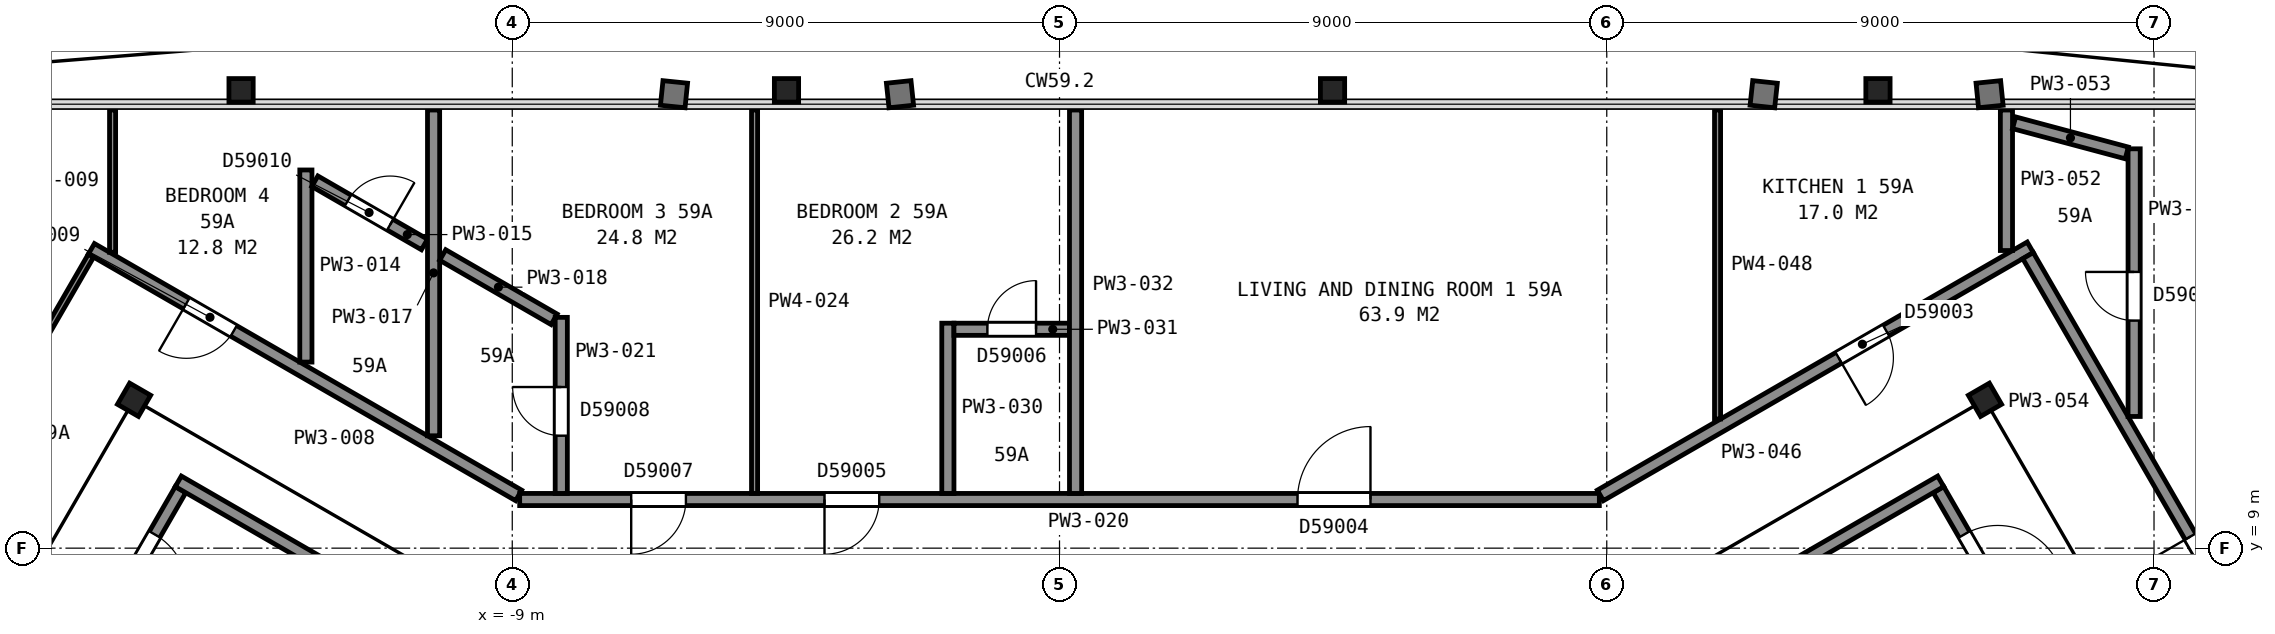
"""IFC4 building model, lengths in metres.
Left out: names, types, materials, properties, quantities, classifications, styles, units other than length and angle.
Written with IfcOpenShell. Run it as: python <this file> out.ifc"""

import sys

from ifc_helpers import new_model, si_unit, direction, frame, frame_2d, origin, origin_2d, place, context, subcontext, project, spatial, rectangle, i_section, extrude, element, fill, save


model = new_model("IFC4")
c1 = context("Model", 3, precision=1e-05, world=origin(), true_north=direction((0.0, 1.0)))
c2 = subcontext(c1, "Body", "Model", "MODEL_VIEW")
j1 = project(units=[si_unit("LENGTHUNIT", "METRE"), si_unit("PLANEANGLEUNIT", "RADIAN")], contexts=[c1])
p1 = place(None, origin())
s1 = spatial("IfcSite", under=j1, at=p1, CompositionType="ELEMENT")
p2 = place(p1, origin())
s2 = spatial("IfcBuilding", under=s1, at=p2, CompositionType="ELEMENT")
p3 = place(p2, frame((0.0, 0.0, 236.0)))
s3 = spatial("IfcBuildingStorey", under=s2, at=p3, CompositionType="ELEMENT", Elevation=236.0)
for number, where, z_axis, x_axis in (
    (1, (13.46, 16.53, 0.035), (0.0, 0.0, 1.0), (1.0, 0.0, 0.0)),
    (2, (4.49, 16.53, 0.035), (0.0, 0.0, 1.0), (1.0, 0.0, 0.0)),
    (3, (-4.49, 16.53, 0.035), (0.0, 0.0, 1.0), (1.0, 0.0, 0.0)),
    (4, (-13.46, 16.53, 0.035), (0.0, 0.0, 1.0), (1.0, 0.0, 0.0)),
):
    element("IfcColumn", number, at=place(p3, frame(where, z_axis=z_axis, x_axis=x_axis)), inside=s3, PredefinedType="COLUMN", context=c2, shape_type="SweptSolid", body=[
        extrude(i_section(OverallWidth=0.399, OverallDepth=0.386, WebThickness=0.021, FlangeThickness=0.033, FilletRadius=0.015, at=origin_2d()), origin(), (0.0, 0.0, 1.0), 3.665),
    ])
for number, where, z_axis, x_axis in (
    (5, (15.22, 11.44, 0.0), (0.0, 0.0, 1.0), (0.5, -0.866, 0.0)),
    (6, (-15.22, 11.44, 0.0), (0.0, 0.0, 1.0), (0.5, 0.866, 0.0)),
):
    element("IfcColumn", number, at=place(p3, frame(where, z_axis=z_axis, x_axis=x_axis)), inside=s3, PredefinedType="COLUMN", context=c2, shape_type="SweptSolid", body=[
        extrude(i_section(OverallWidth=0.401, OverallDepth=0.399, WebThickness=0.025, FlangeThickness=0.04, FilletRadius=0.015, at=origin_2d()), origin(), (0.0, 0.0, 1.0), 3.7),
    ])
p4 = place(p3, frame((15.855, 7.538, 0.0), z_axis=(0.0, 0.0, 1.0), x_axis=(-0.500049511043, 0.865996816683, 0.0)))
e7 = element("IfcWall", 7, at=p4, inside=s3, PredefinedType="PARTITIONING", context=c2, shape_type="SweptSolid", body=[
    extrude(rectangle(XDim=2.8, YDim=0.2, at=frame_2d((1.4, 0.0))), origin(), (0.0, 0.0, 1.0), 3.45),
])
p5 = place(p4, frame((0.85, 0.0, 0.0)))
e8 = element("IfcOpeningElement", 8, at=p5, cuts=e7, PredefinedType="OPENING", context=c2, shape_type="SweptSolid", body=[
    extrude(rectangle(XDim=1.1, YDim=2.1, at=frame_2d((0.55, 1.05))), frame((0.0, 0.11, 0.0), z_axis=(0.0, -1.0, 0.0), x_axis=(1.0, 0.0, 0.0)), (0.0, 0.0, 1.0), 0.22),
])
p6 = place(p3, frame((6.178, 5.299, 0.0), z_axis=(0.0, 0.0, 1.0), x_axis=(0.866019993635, 0.500009370536, 0.0)))
e9 = element("IfcWall", 9, at=p6, inside=s3, PredefinedType="PARTITIONING", context=c2, shape_type="SweptSolid", body=[
    extrude(rectangle(XDim=9.6, YDim=0.2, at=frame_2d((4.8, 0.0))), origin(), (0.0, 0.0, 1.0), 3.45),
])
p7 = place(p3, frame((-14.455, 9.962, 0.0), z_axis=(0.0, 0.0, 1.0), x_axis=(-0.500049511043, -0.865996816683, 0.0)))
e10 = element("IfcWall", 10, at=p7, inside=s3, PredefinedType="PARTITIONING", context=c2, shape_type="SweptSolid", body=[
    extrude(rectangle(XDim=2.8, YDim=0.2, at=frame_2d((1.4, 0.0))), origin(), (0.0, 0.0, 1.0), 3.45),
])
p8 = place(p7, frame((0.85, 0.0, 0.0)))
e11 = element("IfcOpeningElement", 11, at=p8, cuts=e10, PredefinedType="OPENING", context=c2, shape_type="SweptSolid", body=[
    extrude(rectangle(XDim=1.1, YDim=2.1, at=frame_2d((0.55, 1.05))), frame((0.0, 0.11, 0.0), z_axis=(0.0, -1.0, 0.0), x_axis=(1.0, 0.0, 0.0)), (0.0, 0.0, 1.0), 0.22),
])
p9 = place(p3, frame((-6.178, 5.299, 0.0), z_axis=(0.0, 0.0, 1.0), x_axis=(-0.866019993635, 0.500009370536, 0.0)))
e12 = element("IfcWall", 12, at=p9, inside=s3, PredefinedType="PARTITIONING", context=c2, shape_type="SweptSolid", body=[
    extrude(rectangle(XDim=9.6, YDim=0.2, at=frame_2d((4.8, 0.0))), origin(), (0.0, 0.0, 1.0), 3.45),
])
p10 = place(p3, frame((-19.93, 6.888, 0.0), z_axis=(0.0, 0.0, 1.0), x_axis=(0.500420003794, 0.865782778648, 0.0)))
e13 = element("IfcWall", 13, at=p10, inside=s3, PredefinedType="PARTITIONING", context=c2, shape_type="SweptSolid", body=[
    extrude(rectangle(XDim=7.997, YDim=0.1, at=frame_2d((3.999, 0.0))), origin(), (0.0, 0.0, 1.0), 2.713),
])
p11 = place(p10, frame((3.4, 0.0, 0.0)))
e14 = element("IfcOpeningElement", 14, at=p11, cuts=e13, PredefinedType="OPENING", context=c2, shape_type="SweptSolid", body=[
    extrude(rectangle(XDim=1.2, YDim=2.1, at=frame_2d((0.6, 1.05))), frame((0.0, 0.06, 0.0), z_axis=(0.0, -1.0, 0.0), x_axis=(1.0, 0.0, 0.0)), (0.0, 0.0, 1.0), 0.12),
])
p12 = place(p3, frame((-15.921, 13.923, 0.0), z_axis=(0.0, 0.0, 1.0), x_axis=(0.866079355551, -0.499906541154, 0.0)))
e15 = element("IfcWall", 15, at=p12, inside=s3, PredefinedType="PARTITIONING", context=c2, shape_type="SweptSolid", body=[
    extrude(rectangle(XDim=8.113, YDim=0.2, at=frame_2d((4.056, 0.0))), origin(), (0.0, 0.0, 1.0), 2.713),
])
p13 = place(p12, frame((1.802, 0.0, 0.0)))
e16 = element("IfcOpeningElement", 16, at=p13, cuts=e15, PredefinedType="OPENING", context=c2, shape_type="SweptSolid", body=[
    extrude(rectangle(XDim=0.9, YDim=2.1, at=frame_2d((0.45, 1.05))), frame((0.0, 0.11, 0.0), z_axis=(0.0, -1.0, 0.0), x_axis=(1.0, 0.0, 0.0)), (0.0, 0.0, 1.0), 0.22),
])
p14 = place(p3, frame((-15.573, 13.866, 0.0), z_axis=(0.0, 0.0, 1.0), x_axis=(0.0, 1.0, 0.0)))
e17 = element("IfcWall", 17, at=p14, inside=s3, PredefinedType="PARTITIONING", context=c2, shape_type="SweptSolid", body=[
    extrude(rectangle(XDim=2.34, YDim=0.1, at=frame_2d((1.17, 0.0))), origin(), (0.0, 0.0, 1.0), 2.713),
])
p15 = place(p3, frame((-12.394, 12.06, 0.0), z_axis=(0.0, 0.0, 1.0), x_axis=(0.0, 1.0, 0.0)))
e18 = element("IfcWall", 18, at=p15, inside=s3, PredefinedType="PARTITIONING", context=c2, shape_type="SweptSolid", body=[
    extrude(rectangle(XDim=3.16, YDim=0.2, at=frame_2d((1.58, 0.0))), origin(), (0.0, 0.0, 1.0), 2.713),
])
p16 = place(p3, frame((-10.444, 13.995, 0.0), z_axis=(0.0, 0.0, 1.0), x_axis=(-0.866134808485, 0.499810457605, 0.0)))
e19 = element("IfcWall", 19, at=p16, inside=s3, PredefinedType="PARTITIONING", context=c2, shape_type="SweptSolid", body=[
    extrude(rectangle(XDim=2.081, YDim=0.2, at=frame_2d((1.041, 0.0))), origin(), (0.0, 0.0, 1.0), 2.713),
])
p17 = place(p16, frame((0.651, 0.0, 0.0)))
e20 = element("IfcOpeningElement", 20, at=p17, cuts=e19, PredefinedType="OPENING", context=c2, shape_type="SweptSolid", body=[
    extrude(rectangle(XDim=0.8, YDim=2.1, at=frame_2d((0.4, 1.05))), frame((0.0, 0.11, 0.0), z_axis=(0.0, -1.0, 0.0), x_axis=(1.0, 0.0, 0.0)), (0.0, 0.0, 1.0), 0.22),
])
p18 = place(p3, frame((-10.294, 10.848, 0.0), z_axis=(0.0, 0.0, 1.0), x_axis=(0.0, 1.0, 0.0)))
e21 = element("IfcWall", 21, at=p18, inside=s3, PredefinedType="PARTITIONING", context=c2, shape_type="SweptSolid", body=[
    extrude(rectangle(XDim=5.358, YDim=0.2, at=frame_2d((2.679, 0.0))), origin(), (0.0, 0.0, 1.0), 2.713),
])
p19 = place(p3, frame((-10.144, 13.822, 0.0), z_axis=(0.0, 0.0, 1.0), x_axis=(0.866062654302, -0.49993547466, 0.0)))
e22 = element("IfcWall", 22, at=p19, inside=s3, PredefinedType="PARTITIONING", context=c2, shape_type="SweptSolid", body=[
    extrude(rectangle(XDim=2.116, YDim=0.2, at=frame_2d((1.058, 0.0))), origin(), (0.0, 0.0, 1.0), 2.713),
])
p20 = place(p3, frame((-8.878, 9.8, 0.0), z_axis=(0.0, 0.0, 1.0), x_axis=(1.0, 0.0, 0.0)))
e23 = element("IfcWall", 23, at=p20, inside=s3, PredefinedType="PARTITIONING", context=c2, shape_type="SweptSolid", body=[
    extrude(rectangle(XDim=17.756, YDim=0.2, at=frame_2d((8.878, 0.0))), origin(), (0.0, 0.0, 1.0), 2.713),
])
p21 = place(p20, frame((12.792, 0.0, 0.0)))
e24 = element("IfcOpeningElement", 24, at=p21, cuts=e23, PredefinedType="OPENING", context=c2, shape_type="SweptSolid", body=[
    extrude(rectangle(XDim=1.2, YDim=2.1, at=frame_2d((0.6, 1.05))), frame((0.0, 0.11, 0.0), z_axis=(0.0, -1.0, 0.0), x_axis=(1.0, 0.0, 0.0)), (0.0, 0.0, 1.0), 0.22),
])
p22 = place(p20, frame((5.013, 0.0, 0.0)))
e25 = element("IfcOpeningElement", 25, at=p22, cuts=e23, PredefinedType="OPENING", context=c2, shape_type="SweptSolid", body=[
    extrude(rectangle(XDim=0.9, YDim=2.1, at=frame_2d((0.45, 1.05))), frame((0.0, 0.11, 0.0), z_axis=(0.0, -1.0, 0.0), x_axis=(1.0, 0.0, 0.0)), (0.0, 0.0, 1.0), 0.22),
])
p23 = place(p20, frame((1.834, 0.0, 0.0)))
e26 = element("IfcOpeningElement", 26, at=p23, cuts=e23, PredefinedType="OPENING", context=c2, shape_type="SweptSolid", body=[
    extrude(rectangle(XDim=0.9, YDim=2.1, at=frame_2d((0.45, 1.05))), frame((0.0, 0.11, 0.0), z_axis=(0.0, -1.0, 0.0), x_axis=(1.0, 0.0, 0.0)), (0.0, 0.0, 1.0), 0.22),
])
p24 = place(p3, frame((-8.194, 9.9, 0.0), z_axis=(0.0, 0.0, 1.0), x_axis=(0.0, 1.0, 0.0)))
e27 = element("IfcWall", 27, at=p24, inside=s3, PredefinedType="PARTITIONING", context=c2, shape_type="SweptSolid", body=[
    extrude(rectangle(XDim=2.896, YDim=0.2, at=frame_2d((1.448, 0.0))), origin(), (0.0, 0.0, 1.0), 2.713),
])
p25 = place(p24, frame((0.95, 0.0, 0.0)))
e28 = element("IfcOpeningElement", 28, at=p25, cuts=e27, PredefinedType="OPENING", context=c2, shape_type="SweptSolid", body=[
    extrude(rectangle(XDim=0.8, YDim=2.1, at=frame_2d((0.4, 1.05))), frame((0.0, 0.11, 0.0), z_axis=(0.0, -1.0, 0.0), x_axis=(1.0, 0.0, 0.0)), (0.0, 0.0, 1.0), 0.22),
])
p26 = place(p3, frame((-5.015, 9.9, 0.0), z_axis=(0.0, 0.0, 1.0), x_axis=(0.0, 1.0, 0.0)))
e29 = element("IfcWall", 29, at=p26, inside=s3, PredefinedType="PARTITIONING", context=c2, shape_type="SweptSolid", body=[
    extrude(rectangle(XDim=6.306, YDim=0.1, at=frame_2d((3.153, 0.0))), origin(), (0.0, 0.0, 1.0), 2.713),
])
p27 = place(p3, frame((-1.836, 9.9, 0.0), z_axis=(0.0, 0.0, 1.0), x_axis=(0.0, 1.0, 0.0)))
e30 = element("IfcWall", 30, at=p27, inside=s3, PredefinedType="PARTITIONING", context=c2, shape_type="SweptSolid", body=[
    extrude(rectangle(XDim=2.8, YDim=0.2, at=frame_2d((1.4, 0.0))), origin(), (0.0, 0.0, 1.0), 2.713),
])
p28 = place(p3, frame((0.164, 12.6, 0.0), z_axis=(0.0, 0.0, 1.0), x_axis=(-1.0, 0.0, 0.0)))
e31 = element("IfcWall", 31, at=p28, inside=s3, PredefinedType="PARTITIONING", context=c2, shape_type="SweptSolid", body=[
    extrude(rectangle(XDim=1.9, YDim=0.2, at=frame_2d((0.95, 0.0))), origin(), (0.0, 0.0, 1.0), 2.713),
])
p29 = place(p28, frame((0.55, 0.0, 0.0)))
e32 = element("IfcOpeningElement", 32, at=p29, cuts=e31, PredefinedType="OPENING", context=c2, shape_type="SweptSolid", body=[
    extrude(rectangle(XDim=0.8, YDim=2.1, at=frame_2d((0.4, 1.05))), frame((0.0, 0.11, 0.0), z_axis=(0.0, -1.0, 0.0), x_axis=(1.0, 0.0, 0.0)), (0.0, 0.0, 1.0), 0.22),
])
p30 = place(p3, frame((0.264, 9.9, 0.0), z_axis=(0.0, 0.0, 1.0), x_axis=(0.0, 1.0, 0.0)))
e33 = element("IfcWall", 33, at=p30, inside=s3, PredefinedType="PARTITIONING", context=c2, shape_type="SweptSolid", body=[
    extrude(rectangle(XDim=6.306, YDim=0.2, at=frame_2d((3.153, 0.0))), origin(), (0.0, 0.0, 1.0), 2.713),
])
p31 = place(p3, frame((8.895, 9.867, 0.0), z_axis=(0.0, 0.0, 1.0), x_axis=(0.866081499088, 0.499902827495, 0.0)))
e34 = element("IfcWall", 34, at=p31, inside=s3, PredefinedType="PARTITIONING", context=c2, shape_type="SweptSolid", body=[
    extrude(rectangle(XDim=8.163, YDim=0.2, at=frame_2d((4.081, 0.0))), origin(), (0.0, 0.0, 1.0), 2.713),
])
p32 = place(p31, frame((4.525, 0.0, 0.0)))
e35 = element("IfcOpeningElement", 35, at=p32, cuts=e34, PredefinedType="OPENING", context=c2, shape_type="SweptSolid", body=[
    extrude(rectangle(XDim=0.9, YDim=2.1, at=frame_2d((0.45, 1.05))), frame((0.0, 0.11, 0.0), z_axis=(0.0, -1.0, 0.0), x_axis=(1.0, 0.0, 0.0)), (0.0, 0.0, 1.0), 0.22),
])
p33 = place(p3, frame((10.822, 11.124, 0.0), z_axis=(0.0, 0.0, 1.0), x_axis=(0.0, 1.0, 0.0)))
e36 = element("IfcWall", 36, at=p33, inside=s3, PredefinedType="PARTITIONING", context=c2, shape_type="SweptSolid", body=[
    extrude(rectangle(XDim=5.082, YDim=0.1, at=frame_2d((2.541, 0.0))), origin(), (0.0, 0.0, 1.0), 2.713),
])
p34 = place(p3, frame((15.573, 13.895, 0.0), z_axis=(0.0, 0.0, 1.0), x_axis=(0.0, 1.0, 0.0)))
e37 = element("IfcWall", 37, at=p34, inside=s3, PredefinedType="PARTITIONING", context=c2, shape_type="SweptSolid", body=[
    extrude(rectangle(XDim=2.311, YDim=0.2, at=frame_2d((1.155, 0.0))), origin(), (0.0, 0.0, 1.0), 2.713),
])
p35 = place(p3, frame((15.699, 15.996, 0.0), z_axis=(0.0, 0.0, 1.0), x_axis=(0.96599800534, -0.258549518816, 0.0)))
e38 = element("IfcWall", 38, at=p35, inside=s3, PredefinedType="PARTITIONING", context=c2, shape_type="SweptSolid", body=[
    extrude(rectangle(XDim=1.919, YDim=0.2, at=frame_2d((0.959, 0.0))), origin(), (0.0, 0.0, 1.0), 2.713),
])
p36 = place(p3, frame((15.928, 13.812, 0.0), z_axis=(0.0, 0.0, 1.0), x_axis=(0.500422653123, -0.865781247337, 0.0)))
e39 = element("IfcWall", 39, at=p36, inside=s3, PredefinedType="PARTITIONING", context=c2, shape_type="SweptSolid", body=[
    extrude(rectangle(XDim=8.047, YDim=0.2, at=frame_2d((4.024, 0.0))), origin(), (0.0, 0.0, 1.0), 2.713),
])
p37 = place(p36, frame((5.337, 0.0, 0.0)))
e40 = element("IfcOpeningElement", 40, at=p37, cuts=e39, PredefinedType="OPENING", context=c2, shape_type="SweptSolid", body=[
    extrude(rectangle(XDim=0.9, YDim=2.1, at=frame_2d((0.45, 1.05))), frame((0.0, 0.11, 0.0), z_axis=(0.0, -1.0, 0.0), x_axis=(1.0, 0.0, 0.0)), (0.0, 0.0, 1.0), 0.22),
])
p38 = place(p3, frame((17.673, 11.166, 0.0), z_axis=(0.0, 0.0, 1.0), x_axis=(0.0, 1.0, 0.0)))
e41 = element("IfcWall", 41, at=p38, inside=s3, PredefinedType="PARTITIONING", context=c2, shape_type="SweptSolid", body=[
    extrude(rectangle(XDim=4.402, YDim=0.2, at=frame_2d((2.201, 0.0))), origin(), (0.0, 0.0, 1.0), 2.713),
])
p39 = place(p38, frame((1.577, 0.0, 0.0)))
e42 = element("IfcOpeningElement", 42, at=p39, cuts=e41, PredefinedType="OPENING", context=c2, shape_type="SweptSolid", body=[
    extrude(rectangle(XDim=0.8, YDim=2.1, at=frame_2d((0.4, 1.05))), frame((0.0, 0.11, 0.0), z_axis=(0.0, -1.0, 0.0), x_axis=(1.0, 0.0, 0.0)), (0.0, 0.0, 1.0), 0.22),
])
p40 = place(p5, origin())
e43 = element("IfcDoor", 43, at=p40, inside=s3, OperationType="SINGLE_SWING_LEFT", PredefinedType="DOOR", context=c2, shape_type="SweptSolid", body=[
    extrude(rectangle(XDim=1.1, YDim=2.1, at=frame_2d((0.55, 1.05))), frame((0.0, 0.025, 0.0), z_axis=(0.0, -1.0, 0.0), x_axis=(1.0, 0.0, 0.0)), (0.0, 0.0, 1.0), 0.05),
])
fill(e8, e43)
p41 = place(p8, origin())
e44 = element("IfcDoor", 44, at=p41, inside=s3, OperationType="SINGLE_SWING_RIGHT", PredefinedType="DOOR", context=c2, shape_type="SweptSolid", body=[
    extrude(rectangle(XDim=1.1, YDim=2.1, at=frame_2d((0.55, 1.05))), frame((0.0, 0.025, 0.0), z_axis=(0.0, -1.0, 0.0), x_axis=(1.0, 0.0, 0.0)), (0.0, 0.0, 1.0), 0.05),
])
fill(e11, e44)
p42 = place(p13, origin())
e45 = element("IfcDoor", 45, at=p42, inside=s3, OperationType="SINGLE_SWING_LEFT", PredefinedType="DOOR", context=c2, shape_type="SweptSolid", body=[
    extrude(rectangle(XDim=0.9, YDim=2.1, at=frame_2d((0.45, 1.05))), frame((0.0, 0.025, 0.0), z_axis=(0.0, -1.0, 0.0), x_axis=(1.0, 0.0, 0.0)), (0.0, 0.0, 1.0), 0.05),
])
fill(e16, e45)
p43 = place(p17, origin())
e46 = element("IfcDoor", 46, at=p43, inside=s3, OperationType="SINGLE_SWING_LEFT", PredefinedType="DOOR", context=c2, shape_type="SweptSolid", body=[
    extrude(rectangle(XDim=0.8, YDim=2.1, at=frame_2d((0.4, 1.05))), frame((0.0, 0.025, 0.0), z_axis=(0.0, -1.0, 0.0), x_axis=(1.0, 0.0, 0.0)), (0.0, 0.0, 1.0), 0.05),
])
fill(e20, e46)
p44 = place(p21, origin())
e47 = element("IfcDoor", 47, at=p44, inside=s3, OperationType="SINGLE_SWING_RIGHT", PredefinedType="DOOR", context=c2, shape_type="SweptSolid", body=[
    extrude(rectangle(XDim=1.2, YDim=2.1, at=frame_2d((0.6, 1.05))), frame((0.0, 0.025, 0.0), z_axis=(0.0, -1.0, 0.0), x_axis=(1.0, 0.0, 0.0)), (0.0, 0.0, 1.0), 0.05),
])
fill(e24, e47)
p45 = place(p22, origin())
e48 = element("IfcDoor", 48, at=p45, inside=s3, OperationType="SINGLE_SWING_LEFT", PredefinedType="DOOR", context=c2, shape_type="SweptSolid", body=[
    extrude(rectangle(XDim=0.9, YDim=2.1, at=frame_2d((0.45, 1.05))), frame((0.0, 0.025, 0.0), z_axis=(0.0, -1.0, 0.0), x_axis=(1.0, 0.0, 0.0)), (0.0, 0.0, 1.0), 0.05),
])
fill(e25, e48)
p46 = place(p23, origin())
e49 = element("IfcDoor", 49, at=p46, inside=s3, OperationType="SINGLE_SWING_LEFT", PredefinedType="DOOR", context=c2, shape_type="SweptSolid", body=[
    extrude(rectangle(XDim=0.9, YDim=2.1, at=frame_2d((0.45, 1.05))), frame((0.0, 0.025, 0.0), z_axis=(0.0, -1.0, 0.0), x_axis=(1.0, 0.0, 0.0)), (0.0, 0.0, 1.0), 0.05),
])
fill(e26, e49)
p47 = place(p25, origin())
e50 = element("IfcDoor", 50, at=p47, inside=s3, OperationType="SINGLE_SWING_RIGHT", PredefinedType="DOOR", context=c2, shape_type="SweptSolid", body=[
    extrude(rectangle(XDim=0.8, YDim=2.1, at=frame_2d((0.4, 1.05))), frame((0.0, 0.025, 0.0), z_axis=(0.0, -1.0, 0.0), x_axis=(1.0, 0.0, 0.0)), (0.0, 0.0, 1.0), 0.05),
])
fill(e28, e50)
p48 = place(p29, origin())
e51 = element("IfcDoor", 51, at=p48, inside=s3, OperationType="SINGLE_SWING_LEFT", PredefinedType="DOOR", context=c2, shape_type="SweptSolid", body=[
    extrude(rectangle(XDim=0.8, YDim=2.1, at=frame_2d((0.4, 1.05))), frame((0.0, 0.025, 0.0), z_axis=(0.0, -1.0, 0.0), x_axis=(1.0, 0.0, 0.0)), (0.0, 0.0, 1.0), 0.05),
])
fill(e32, e51)
p49 = place(p32, origin())
e52 = element("IfcDoor", 52, at=p49, inside=s3, OperationType="SINGLE_SWING_LEFT", PredefinedType="DOOR", context=c2, shape_type="SweptSolid", body=[
    extrude(rectangle(XDim=0.9, YDim=2.1, at=frame_2d((0.45, 1.05))), frame((0.0, 0.025, 0.0), z_axis=(0.0, -1.0, 0.0), x_axis=(1.0, 0.0, 0.0)), (0.0, 0.0, 1.0), 0.05),
])
fill(e35, e52)
p50 = place(p37, origin())
e53 = element("IfcDoor", 53, at=p50, inside=s3, OperationType="SINGLE_SWING_LEFT", PredefinedType="DOOR", context=c2, shape_type="SweptSolid", body=[
    extrude(rectangle(XDim=0.9, YDim=2.1, at=frame_2d((0.45, 1.05))), frame((0.0, 0.025, 0.0), z_axis=(0.0, -1.0, 0.0), x_axis=(1.0, 0.0, 0.0)), (0.0, 0.0, 1.0), 0.05),
])
fill(e40, e53)
p51 = place(p39, origin())
e54 = element("IfcDoor", 54, at=p51, inside=s3, OperationType="SINGLE_SWING_RIGHT", PredefinedType="DOOR", context=c2, shape_type="SweptSolid", body=[
    extrude(rectangle(XDim=0.8, YDim=2.1, at=frame_2d((0.4, 1.05))), frame((0.0, 0.025, 0.0), z_axis=(0.0, -1.0, 0.0), x_axis=(1.0, 0.0, 0.0)), (0.0, 0.0, 1.0), 0.05),
])
fill(e42, e54)
save(model, sys.argv[1])
